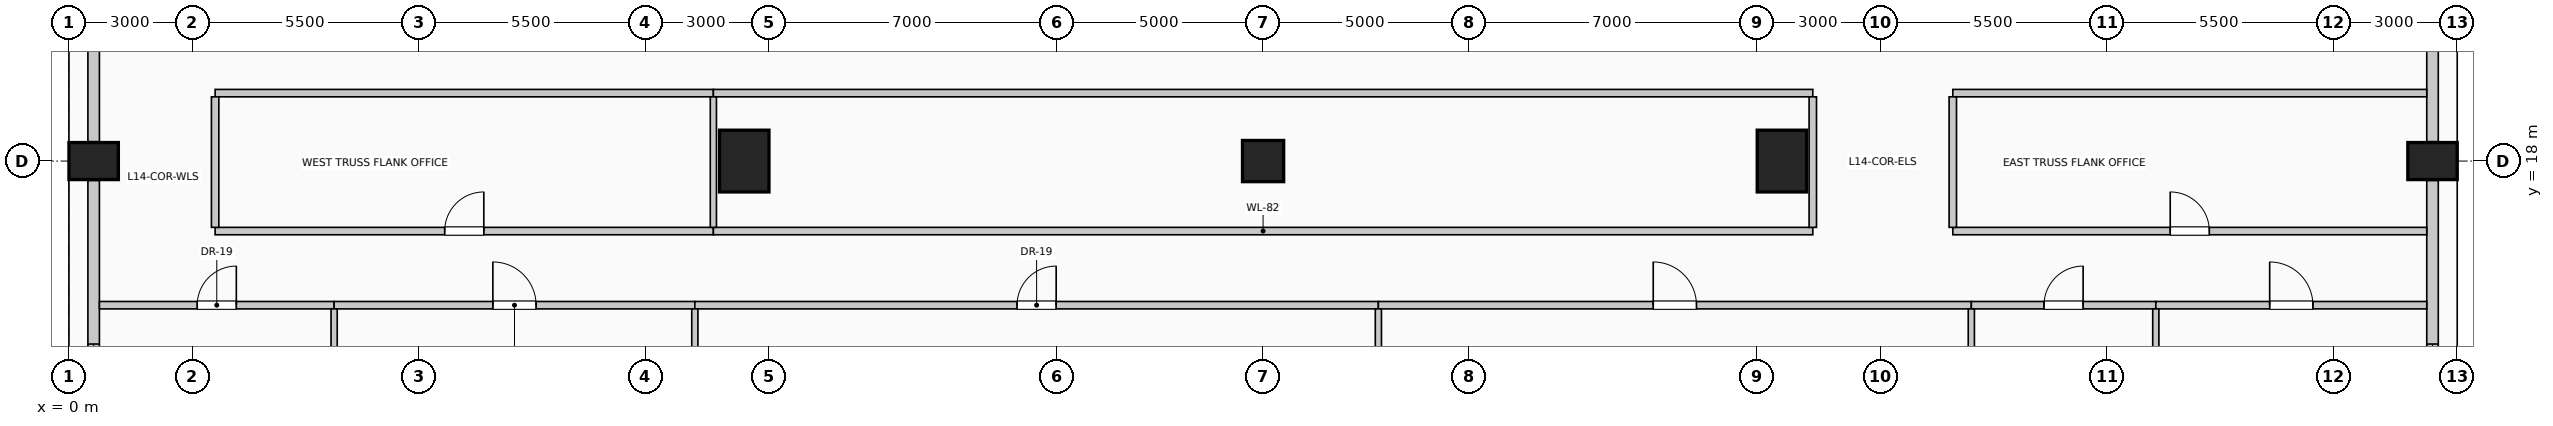
"""IFC4 building model, lengths in metres.
Left out: names, types, materials, properties, quantities, classifications, styles, units other than length and angle.
Written with IfcOpenShell. Run it as: python <this file> out.ifc"""

import sys

from ifc_helpers import new_model, si_unit, direction, frame, frame_2d, origin, origin_2d, place, context, subcontext, project, spatial, rectangle, circle, extrude, element, fill, save


model = new_model("IFC4")
c1 = context("Model", 3, precision=1e-05, world=origin(), true_north=direction((0.0, 1.0)))
c2 = subcontext(c1, "Body", "Model", "MODEL_VIEW")
j1 = project(units=[si_unit("LENGTHUNIT", "METRE"), si_unit("PLANEANGLEUNIT", "RADIAN")], contexts=[c1])
p1 = place(None, origin())
s1 = spatial("IfcSite", under=j1, at=p1, CompositionType="ELEMENT")
p2 = place(p1, origin())
s2 = spatial("IfcBuilding", under=s1, at=p2, CompositionType="ELEMENT")
p3 = place(p2, frame((0.0, 0.0, 58.6)))
s3 = spatial("IfcBuildingStorey", under=s2, at=p3, CompositionType="ELEMENT", Elevation=58.6)
for number, where, z_axis, x_axis in (
    (1, (0.6, 18.0, 0.0), (0.0, 0.0, 1.0), (0.0, 1.0, 0.0)),
    (2, (57.4, 18.0, 0.0), (0.0, 0.0, 1.0), (0.0, 1.0, 0.0)),
):
    element("IfcColumn", number, at=place(p3, frame(where, z_axis=z_axis, x_axis=x_axis)), inside=s3, PredefinedType="COLUMN", context=c2, shape_type="SweptSolid", body=[
        extrude(rectangle(XDim=0.9, YDim=1.2, at=origin_2d()), origin(), (0.0, 0.0, 1.0), 4.0),
    ])
for number, where, z_axis, x_axis in (
    (3, (16.4, 18.0, 0.0), (0.0, 0.0, 1.0), (1.0, 0.0, 0.0)),
    (4, (41.6, 18.0, 0.0), (0.0, 0.0, 1.0), (1.0, 0.0, 0.0)),
):
    element("IfcColumn", number, at=place(p3, frame(where, z_axis=z_axis, x_axis=x_axis)), inside=s3, PredefinedType="COLUMN", context=c2, shape_type="SweptSolid", body=[
        extrude(rectangle(XDim=1.2, YDim=1.5, at=origin_2d()), origin(), (0.0, 0.0, 1.0), 4.0),
    ])
p4 = place(p3, frame((29.0, 18.0, 0.0), z_axis=(0.0, 0.0, 1.0), x_axis=(1.0, 0.0, 0.0)))
e5 = element("IfcColumn", 5, at=p4, inside=s3, PredefinedType="COLUMN", context=c2, shape_type="SweptSolid", body=[
    extrude(circle(Radius=0.5, at=origin_2d()), origin(), (0.0, 0.0, 1.0), 4.0),
])
p5 = place(p3, frame((0.6, 10.47, 0.0), z_axis=(0.0, 0.0, 1.0), x_axis=(0.0, 1.0, 0.0)))
e6 = element("IfcWall", 6, at=p5, inside=s3, PredefinedType="SOLIDWALL", context=c2, shape_type="SweptSolid", body=[
    extrude(rectangle(XDim=7.06, YDim=0.28, at=frame_2d((3.53, 0.0))), origin(), (0.0, 0.0, 1.0), 2.85),
])
p6 = place(p5, frame((0.887, 0.0, 0.5)))
e7 = element("IfcOpeningElement", 7, at=p6, cuts=e6, PredefinedType="OPENING", context=c2, shape_type="SweptSolid", body=[
    extrude(rectangle(XDim=2.2, YDim=1.95, at=frame_2d((1.1, 0.975))), frame((0.0, 0.15, 0.0), z_axis=(0.0, -1.0, 0.0), x_axis=(1.0, 0.0, 0.0)), (0.0, 0.0, 1.0), 0.3),
])
p7 = place(p3, frame((0.6, 18.47, 0.0), z_axis=(0.0, 0.0, 1.0), x_axis=(0.0, 1.0, 0.0)))
e8 = element("IfcWall", 8, at=p7, inside=s3, PredefinedType="SOLIDWALL", context=c2, shape_type="SweptSolid", body=[
    extrude(rectangle(XDim=7.06, YDim=0.28, at=frame_2d((3.53, 0.0))), origin(), (0.0, 0.0, 1.0), 2.85),
])
p8 = place(p3, frame((57.4, 17.53, 0.0), z_axis=(0.0, 0.0, 1.0), x_axis=(0.0, -1.0, 0.0)))
e9 = element("IfcWall", 9, at=p8, inside=s3, PredefinedType="SOLIDWALL", context=c2, shape_type="SweptSolid", body=[
    extrude(rectangle(XDim=7.06, YDim=0.28, at=frame_2d((3.53, 0.0))), origin(), (0.0, 0.0, 1.0), 2.85),
])
p9 = place(p8, frame((3.973, 0.0, 0.5)))
e10 = element("IfcOpeningElement", 10, at=p9, cuts=e9, PredefinedType="OPENING", context=c2, shape_type="SweptSolid", body=[
    extrude(rectangle(XDim=2.2, YDim=1.95, at=frame_2d((1.1, 0.975))), frame((0.0, 0.15, 0.0), z_axis=(0.0, -1.0, 0.0), x_axis=(1.0, 0.0, 0.0)), (0.0, 0.0, 1.0), 0.3),
])
p10 = place(p3, frame((57.4, 25.53, 0.0), z_axis=(0.0, 0.0, 1.0), x_axis=(0.0, -1.0, 0.0)))
e11 = element("IfcWall", 11, at=p10, inside=s3, PredefinedType="SOLIDWALL", context=c2, shape_type="SweptSolid", body=[
    extrude(rectangle(XDim=7.06, YDim=0.28, at=frame_2d((3.53, 0.0))), origin(), (0.0, 0.0, 1.0), 2.85),
])
p11 = place(p3, frame((0.74, 14.5, 0.0), z_axis=(0.0, 0.0, 1.0), x_axis=(1.0, 0.0, 0.0)))
e12 = element("IfcWall", 12, at=p11, inside=s3, PredefinedType="PARTITIONING", context=c2, shape_type="SweptSolid", body=[
    extrude(rectangle(XDim=5.7, YDim=0.18, at=frame_2d((2.85, 0.0))), origin(), (0.0, 0.0, 1.0), 3.7),
])
p12 = place(p11, frame((2.375, 0.0, 0.0)))
e13 = element("IfcOpeningElement", 13, at=p12, cuts=e12, PredefinedType="OPENING", context=c2, shape_type="SweptSolid", body=[
    extrude(rectangle(XDim=0.95, YDim=2.15, at=frame_2d((0.475, 1.075))), frame((0.0, 0.1, 0.0), z_axis=(0.0, -1.0, 0.0), x_axis=(1.0, 0.0, 0.0)), (0.0, 0.0, 1.0), 0.2),
])
p13 = place(p3, frame((6.44, 14.5, 0.0), z_axis=(0.0, 0.0, 1.0), x_axis=(1.0, 0.0, 0.0)))
e14 = element("IfcWall", 14, at=p13, inside=s3, PredefinedType="PARTITIONING", context=c2, shape_type="SweptSolid", body=[
    extrude(rectangle(XDim=8.76, YDim=0.18, at=frame_2d((4.38, 0.0))), origin(), (0.0, 0.0, 1.0), 3.7),
])
p14 = place(p13, frame((3.855, 0.0, 0.0)))
e15 = element("IfcOpeningElement", 15, at=p14, cuts=e14, PredefinedType="OPENING", context=c2, shape_type="SweptSolid", body=[
    extrude(rectangle(XDim=1.05, YDim=2.15, at=frame_2d((0.525, 1.075))), frame((0.0, 0.1, 0.0), z_axis=(0.0, -1.0, 0.0), x_axis=(1.0, 0.0, 0.0)), (0.0, 0.0, 1.0), 0.2),
])
p15 = place(p3, frame((15.2, 14.5, 0.0), z_axis=(0.0, 0.0, 1.0), x_axis=(1.0, 0.0, 0.0)))
e16 = element("IfcWall", 16, at=p15, inside=s3, PredefinedType="PARTITIONING", context=c2, shape_type="SweptSolid", body=[
    extrude(rectangle(XDim=16.6, YDim=0.18, at=frame_2d((8.3, 0.0))), origin(), (0.0, 0.0, 1.0), 3.7),
])
p16 = place(p15, frame((7.825, 0.0, 0.0)))
e17 = element("IfcOpeningElement", 17, at=p16, cuts=e16, PredefinedType="OPENING", context=c2, shape_type="SweptSolid", body=[
    extrude(rectangle(XDim=0.95, YDim=2.15, at=frame_2d((0.475, 1.075))), frame((0.0, 0.1, 0.0), z_axis=(0.0, -1.0, 0.0), x_axis=(1.0, 0.0, 0.0)), (0.0, 0.0, 1.0), 0.2),
])
p17 = place(p3, frame((31.8, 14.5, 0.0), z_axis=(0.0, 0.0, 1.0), x_axis=(1.0, 0.0, 0.0)))
e18 = element("IfcWall", 18, at=p17, inside=s3, PredefinedType="PARTITIONING", context=c2, shape_type="SweptSolid", body=[
    extrude(rectangle(XDim=14.4, YDim=0.18, at=frame_2d((7.2, 0.0))), origin(), (0.0, 0.0, 1.0), 3.7),
])
p18 = place(p17, frame((6.675, 0.0, 0.0)))
e19 = element("IfcOpeningElement", 19, at=p18, cuts=e18, PredefinedType="OPENING", context=c2, shape_type="SweptSolid", body=[
    extrude(rectangle(XDim=1.05, YDim=2.15, at=frame_2d((0.525, 1.075))), frame((0.0, 0.1, 0.0), z_axis=(0.0, -1.0, 0.0), x_axis=(1.0, 0.0, 0.0)), (0.0, 0.0, 1.0), 0.2),
])
p19 = place(p3, frame((46.2, 14.5, 0.0), z_axis=(0.0, 0.0, 1.0), x_axis=(1.0, 0.0, 0.0)))
e20 = element("IfcWall", 20, at=p19, inside=s3, PredefinedType="PARTITIONING", context=c2, shape_type="SweptSolid", body=[
    extrude(rectangle(XDim=4.48, YDim=0.18, at=frame_2d((2.24, 0.0))), origin(), (0.0, 0.0, 1.0), 3.7),
])
p20 = place(p19, frame((1.765, 0.0, 0.0)))
e21 = element("IfcOpeningElement", 21, at=p20, cuts=e20, PredefinedType="OPENING", context=c2, shape_type="SweptSolid", body=[
    extrude(rectangle(XDim=0.95, YDim=2.15, at=frame_2d((0.475, 1.075))), frame((0.0, 0.1, 0.0), z_axis=(0.0, -1.0, 0.0), x_axis=(1.0, 0.0, 0.0)), (0.0, 0.0, 1.0), 0.2),
])
p21 = place(p3, frame((50.68, 14.5, 0.0), z_axis=(0.0, 0.0, 1.0), x_axis=(1.0, 0.0, 0.0)))
e22 = element("IfcWall", 22, at=p21, inside=s3, PredefinedType="PARTITIONING", context=c2, shape_type="SweptSolid", body=[
    extrude(rectangle(XDim=6.58, YDim=0.18, at=frame_2d((3.29, 0.0))), origin(), (0.0, 0.0, 1.0), 3.7),
])
p22 = place(p21, frame((2.765, 0.0, 0.0)))
e23 = element("IfcOpeningElement", 23, at=p22, cuts=e22, PredefinedType="OPENING", context=c2, shape_type="SweptSolid", body=[
    extrude(rectangle(XDim=1.05, YDim=2.15, at=frame_2d((0.525, 1.075))), frame((0.0, 0.1, 0.0), z_axis=(0.0, -1.0, 0.0), x_axis=(1.0, 0.0, 0.0)), (0.0, 0.0, 1.0), 0.2),
])
p23 = place(p3, frame((3.55, 16.3, 0.0), z_axis=(0.0, 0.0, 1.0), x_axis=(1.0, 0.0, 0.0)))
e24 = element("IfcWall", 24, at=p23, inside=s3, PredefinedType="PARTITIONING", context=c2, shape_type="SweptSolid", body=[
    extrude(rectangle(XDim=12.1, YDim=0.18, at=frame_2d((6.05, 0.0))), origin(), (0.0, 0.0, 1.0), 3.7),
])
p24 = place(p23, frame((5.575, 0.0, 0.0)))
e25 = element("IfcOpeningElement", 25, at=p24, cuts=e24, PredefinedType="OPENING", context=c2, shape_type="SweptSolid", body=[
    extrude(rectangle(XDim=0.95, YDim=2.15, at=frame_2d((0.475, 1.075))), frame((0.0, 0.1, 0.0), z_axis=(0.0, -1.0, 0.0), x_axis=(1.0, 0.0, 0.0)), (0.0, 0.0, 1.0), 0.2),
])
p25 = place(p3, frame((15.65, 16.3, 0.0), z_axis=(0.0, 0.0, 1.0), x_axis=(1.0, 0.0, 0.0)))
e26 = element("IfcWall", 26, at=p25, inside=s3, PredefinedType="PARTITIONING", context=c2, shape_type="SweptSolid", body=[
    extrude(rectangle(XDim=26.7, YDim=0.18, at=frame_2d((13.35, 0.0))), origin(), (0.0, 0.0, 1.0), 3.7),
])
p26 = place(p3, frame((45.75, 16.3, 0.0), z_axis=(0.0, 0.0, 1.0), x_axis=(1.0, 0.0, 0.0)))
e27 = element("IfcWall", 27, at=p26, inside=s3, PredefinedType="PARTITIONING", context=c2, shape_type="SweptSolid", body=[
    extrude(rectangle(XDim=11.51, YDim=0.18, at=frame_2d((5.755, 0.0))), origin(), (0.0, 0.0, 1.0), 3.7),
])
p27 = place(p26, frame((5.28, 0.0, 0.0)))
e28 = element("IfcOpeningElement", 28, at=p27, cuts=e27, PredefinedType="OPENING", context=c2, shape_type="SweptSolid", body=[
    extrude(rectangle(XDim=0.95, YDim=2.15, at=frame_2d((0.475, 1.075))), frame((0.0, 0.1, 0.0), z_axis=(0.0, -1.0, 0.0), x_axis=(1.0, 0.0, 0.0)), (0.0, 0.0, 1.0), 0.2),
])
p28 = place(p3, frame((3.55, 19.65, 0.0), z_axis=(0.0, 0.0, 1.0), x_axis=(1.0, 0.0, 0.0)))
e29 = element("IfcWall", 29, at=p28, inside=s3, PredefinedType="PARTITIONING", context=c2, shape_type="SweptSolid", body=[
    extrude(rectangle(XDim=12.1, YDim=0.18, at=frame_2d((6.05, 0.0))), origin(), (0.0, 0.0, 1.0), 3.7),
])
p29 = place(p3, frame((15.65, 19.65, 0.0), z_axis=(0.0, 0.0, 1.0), x_axis=(1.0, 0.0, 0.0)))
e30 = element("IfcWall", 30, at=p29, inside=s3, PredefinedType="PARTITIONING", context=c2, shape_type="SweptSolid", body=[
    extrude(rectangle(XDim=26.7, YDim=0.18, at=frame_2d((13.35, 0.0))), origin(), (0.0, 0.0, 1.0), 3.7),
])
p30 = place(p3, frame((45.75, 19.65, 0.0), z_axis=(0.0, 0.0, 1.0), x_axis=(1.0, 0.0, 0.0)))
e31 = element("IfcWall", 31, at=p30, inside=s3, PredefinedType="PARTITIONING", context=c2, shape_type="SweptSolid", body=[
    extrude(rectangle(XDim=11.51, YDim=0.18, at=frame_2d((5.755, 0.0))), origin(), (0.0, 0.0, 1.0), 3.7),
])
p31 = place(p3, frame((3.55, 16.39, 0.0), z_axis=(0.0, 0.0, 1.0), x_axis=(0.0, 1.0, 0.0)))
e32 = element("IfcWall", 32, at=p31, inside=s3, PredefinedType="PARTITIONING", context=c2, shape_type="SweptSolid", body=[
    extrude(rectangle(XDim=3.17, YDim=0.18, at=frame_2d((1.585, 0.0))), origin(), (0.0, 0.0, 1.0), 3.7),
])
for number, where, z_axis, x_axis in (
    (33, (6.44, 0.74, 0.0), (0.0, 0.0, 1.0), (0.0, 1.0, 0.0)),
    (34, (15.2, 0.74, 0.0), (0.0, 0.0, 1.0), (0.0, 1.0, 0.0)),
):
    element("IfcWall", number, at=place(p3, frame(where, z_axis=z_axis, x_axis=x_axis)), inside=s3, PredefinedType="PARTITIONING", context=c2, shape_type="SweptSolid", body=[
        extrude(rectangle(XDim=13.67, YDim=0.15, at=frame_2d((6.835, 0.0))), origin(), (0.0, 0.0, 1.0), 3.7),
    ])
p32 = place(p3, frame((15.65, 16.39, 0.0), z_axis=(0.0, 0.0, 1.0), x_axis=(0.0, 1.0, 0.0)))
e35 = element("IfcWall", 35, at=p32, inside=s3, PredefinedType="PARTITIONING", context=c2, shape_type="SweptSolid", body=[
    extrude(rectangle(XDim=3.17, YDim=0.15, at=frame_2d((1.585, 0.0))), origin(), (0.0, 0.0, 1.0), 3.7),
])
p33 = place(p3, frame((31.8, 0.74, 0.0), z_axis=(0.0, 0.0, 1.0), x_axis=(0.0, 1.0, 0.0)))
e36 = element("IfcWall", 36, at=p33, inside=s3, PredefinedType="PARTITIONING", context=c2, shape_type="SweptSolid", body=[
    extrude(rectangle(XDim=13.67, YDim=0.15, at=frame_2d((6.835, 0.0))), origin(), (0.0, 0.0, 1.0), 3.7),
])
for number, where, z_axis, x_axis in (
    (37, (42.35, 16.39, 0.0), (0.0, 0.0, 1.0), (0.0, 1.0, 0.0)),
    (38, (45.75, 16.39, 0.0), (0.0, 0.0, 1.0), (0.0, 1.0, 0.0)),
):
    element("IfcWall", number, at=place(p3, frame(where, z_axis=z_axis, x_axis=x_axis)), inside=s3, PredefinedType="PARTITIONING", context=c2, shape_type="SweptSolid", body=[
        extrude(rectangle(XDim=3.17, YDim=0.18, at=frame_2d((1.585, 0.0))), origin(), (0.0, 0.0, 1.0), 3.7),
    ])
for number, where, z_axis, x_axis in (
    (39, (46.2, 0.74, 0.0), (0.0, 0.0, 1.0), (0.0, 1.0, 0.0)),
    (40, (50.68, 0.74, 0.0), (0.0, 0.0, 1.0), (0.0, 1.0, 0.0)),
):
    element("IfcWall", number, at=place(p3, frame(where, z_axis=z_axis, x_axis=x_axis)), inside=s3, PredefinedType="PARTITIONING", context=c2, shape_type="SweptSolid", body=[
        extrude(rectangle(XDim=13.67, YDim=0.15, at=frame_2d((6.835, 0.0))), origin(), (0.0, 0.0, 1.0), 3.7),
    ])
p34 = place(p6, origin())
e41 = element("IfcWindow", 41, at=p34, inside=s3, PartitioningType="SINGLE_PANEL", PredefinedType="WINDOW", context=c2, shape_type="SweptSolid", body=[
    extrude(rectangle(XDim=2.2, YDim=1.95, at=frame_2d((1.1, 0.975))), frame((0.0, 0.03, 0.0), z_axis=(0.0, -1.0, 0.0), x_axis=(1.0, 0.0, 0.0)), (0.0, 0.0, 1.0), 0.06),
])
fill(e7, e41)
p35 = place(p9, origin())
e42 = element("IfcWindow", 42, at=p35, inside=s3, PartitioningType="SINGLE_PANEL", PredefinedType="WINDOW", context=c2, shape_type="SweptSolid", body=[
    extrude(rectangle(XDim=2.2, YDim=1.95, at=frame_2d((1.1, 0.975))), frame((0.0, 0.03, 0.0), z_axis=(0.0, -1.0, 0.0), x_axis=(1.0, 0.0, 0.0)), (0.0, 0.0, 1.0), 0.06),
])
fill(e10, e42)
p36 = place(p12, origin())
e43 = element("IfcDoor", 43, at=p36, inside=s3, OperationType="SINGLE_SWING_RIGHT", PredefinedType="DOOR", context=c2, shape_type="SweptSolid", body=[
    extrude(rectangle(XDim=0.95, YDim=2.15, at=frame_2d((0.475, 1.075))), frame((0.0, 0.025, 0.0), z_axis=(0.0, -1.0, 0.0), x_axis=(1.0, 0.0, 0.0)), (0.0, 0.0, 1.0), 0.05),
])
fill(e13, e43)
p37 = place(p14, origin())
e44 = element("IfcDoor", 44, at=p37, inside=s3, OperationType="SINGLE_SWING_LEFT", PredefinedType="DOOR", context=c2, shape_type="SweptSolid", body=[
    extrude(rectangle(XDim=1.05, YDim=2.15, at=frame_2d((0.525, 1.075))), frame((0.0, 0.025, 0.0), z_axis=(0.0, -1.0, 0.0), x_axis=(1.0, 0.0, 0.0)), (0.0, 0.0, 1.0), 0.05),
])
fill(e15, e44)
p38 = place(p16, origin())
e45 = element("IfcDoor", 45, at=p38, inside=s3, OperationType="SINGLE_SWING_RIGHT", PredefinedType="DOOR", context=c2, shape_type="SweptSolid", body=[
    extrude(rectangle(XDim=0.95, YDim=2.15, at=frame_2d((0.475, 1.075))), frame((0.0, 0.025, 0.0), z_axis=(0.0, -1.0, 0.0), x_axis=(1.0, 0.0, 0.0)), (0.0, 0.0, 1.0), 0.05),
])
fill(e17, e45)
p39 = place(p18, origin())
e46 = element("IfcDoor", 46, at=p39, inside=s3, OperationType="SINGLE_SWING_LEFT", PredefinedType="DOOR", context=c2, shape_type="SweptSolid", body=[
    extrude(rectangle(XDim=1.05, YDim=2.15, at=frame_2d((0.525, 1.075))), frame((0.0, 0.025, 0.0), z_axis=(0.0, -1.0, 0.0), x_axis=(1.0, 0.0, 0.0)), (0.0, 0.0, 1.0), 0.05),
])
fill(e19, e46)
p40 = place(p20, origin())
e47 = element("IfcDoor", 47, at=p40, inside=s3, OperationType="SINGLE_SWING_RIGHT", PredefinedType="DOOR", context=c2, shape_type="SweptSolid", body=[
    extrude(rectangle(XDim=0.95, YDim=2.15, at=frame_2d((0.475, 1.075))), frame((0.0, 0.025, 0.0), z_axis=(0.0, -1.0, 0.0), x_axis=(1.0, 0.0, 0.0)), (0.0, 0.0, 1.0), 0.05),
])
fill(e21, e47)
p41 = place(p22, origin())
e48 = element("IfcDoor", 48, at=p41, inside=s3, OperationType="SINGLE_SWING_LEFT", PredefinedType="DOOR", context=c2, shape_type="SweptSolid", body=[
    extrude(rectangle(XDim=1.05, YDim=2.15, at=frame_2d((0.525, 1.075))), frame((0.0, 0.025, 0.0), z_axis=(0.0, -1.0, 0.0), x_axis=(1.0, 0.0, 0.0)), (0.0, 0.0, 1.0), 0.05),
])
fill(e23, e48)
p42 = place(p24, origin())
e49 = element("IfcDoor", 49, at=p42, inside=s3, OperationType="SINGLE_SWING_RIGHT", PredefinedType="DOOR", context=c2, shape_type="SweptSolid", body=[
    extrude(rectangle(XDim=0.95, YDim=2.15, at=frame_2d((0.475, 1.075))), frame((0.0, 0.025, 0.0), z_axis=(0.0, -1.0, 0.0), x_axis=(1.0, 0.0, 0.0)), (0.0, 0.0, 1.0), 0.05),
])
fill(e25, e49)
p43 = place(p27, origin())
e50 = element("IfcDoor", 50, at=p43, inside=s3, OperationType="SINGLE_SWING_LEFT", PredefinedType="DOOR", context=c2, shape_type="SweptSolid", body=[
    extrude(rectangle(XDim=0.95, YDim=2.15, at=frame_2d((0.475, 1.075))), frame((0.0, 0.025, 0.0), z_axis=(0.0, -1.0, 0.0), x_axis=(1.0, 0.0, 0.0)), (0.0, 0.0, 1.0), 0.05),
])
fill(e28, e50)
save(model, sys.argv[1])
